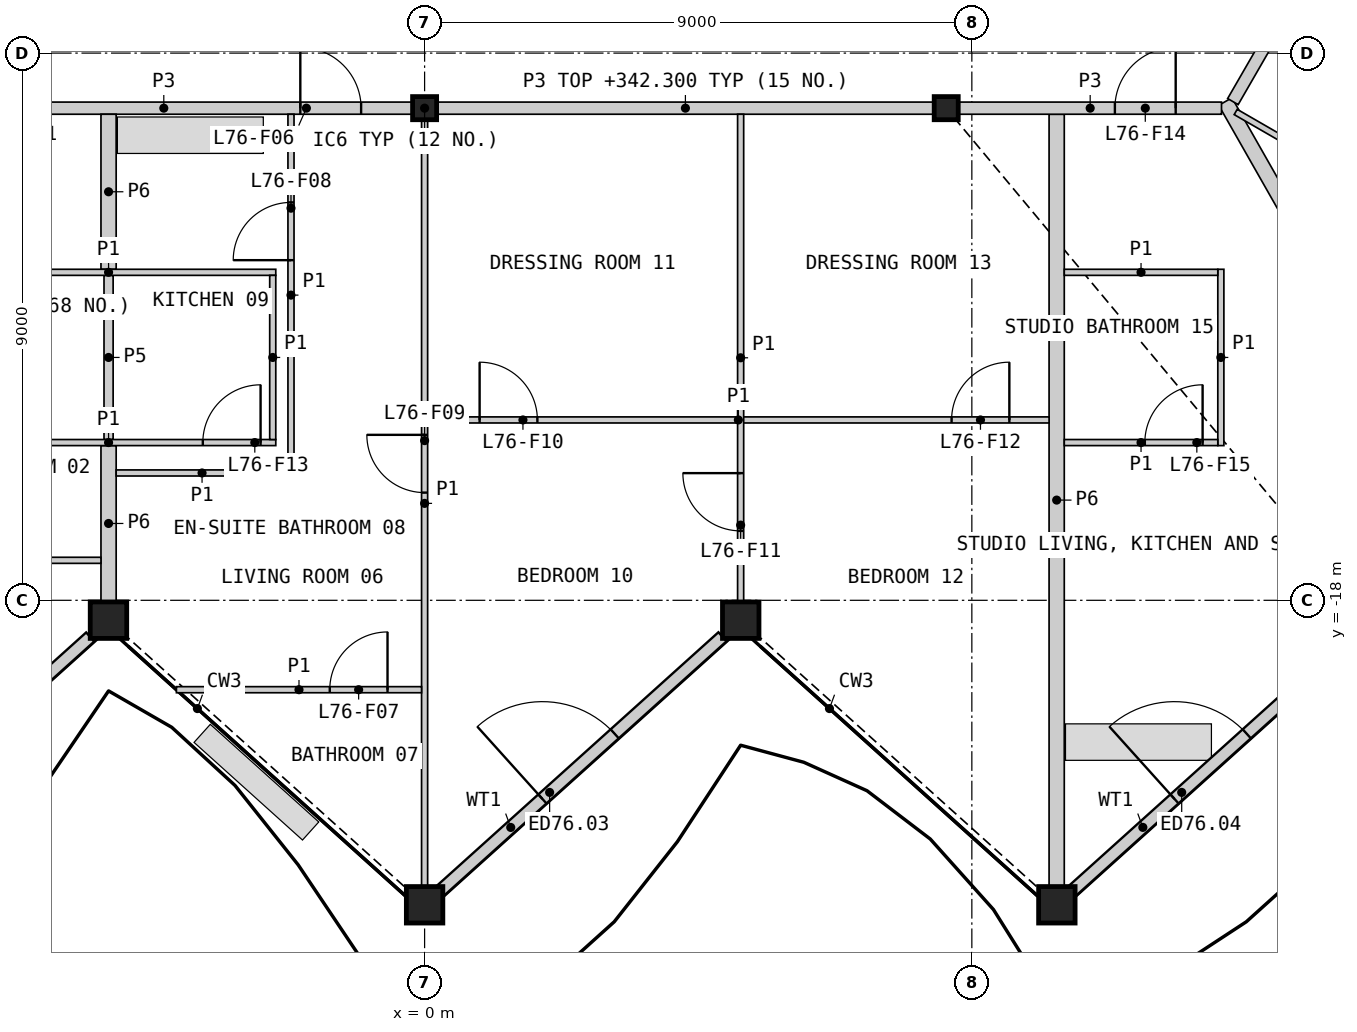
"""IFC4 building model, lengths in metres.
Left out: names, types, materials, properties, quantities, classifications, styles, units other than length and angle.
Written with IfcOpenShell. Run it as: python <this file> out.ifc"""

import sys

from ifc_helpers import new_model, si_unit, direction, frame, frame_2d, origin, origin_2d, place, context, subcontext, project, spatial, rectangle, hollow_rectangle, i_section, extrude, element, fill, save


model = new_model("IFC4")
c1 = context("Model", 3, precision=1e-05, world=origin(), true_north=direction((0.0, 1.0)))
c2 = subcontext(c1, "Body", "Model", "MODEL_VIEW")
j1 = project(units=[si_unit("LENGTHUNIT", "METRE"), si_unit("PLANEANGLEUNIT", "RADIAN")], contexts=[c1])
p1 = place(None, origin())
s1 = spatial("IfcSite", under=j1, at=p1, CompositionType="ELEMENT")
p2 = place(p1, origin())
s2 = spatial("IfcBuilding", under=s1, at=p2, CompositionType="ELEMENT")
p3 = place(p2, frame((0.0, 0.0, 339.2)))
s3 = spatial("IfcBuildingStorey", under=s2, at=p3, CompositionType="ELEMENT", Elevation=339.2)
for number, where, z_axis, x_axis in (
    (1, (-5.199, -18.327, 0.0), (0.0, 0.0, 1.0), (1.0, 0.0, 0.0)),
    (2, (0.0, -23.008, 0.0), (0.0, 0.0, 1.0), (1.0, 0.0, 0.0)),
    (3, (5.199, -18.327, 0.0), (0.0, 0.0, 1.0), (1.0, 0.0, 0.0)),
    (4, (10.398, -23.008, 0.0), (0.0, 0.0, 1.0), (1.0, 0.0, 0.0)),
):
    element("IfcColumn", number, at=place(p3, frame(where, z_axis=z_axis, x_axis=x_axis)), inside=s3, PredefinedType="COLUMN", context=c2, shape_type="SweptSolid", body=[
        extrude(hollow_rectangle(XDim=0.6, YDim=0.6, WallThickness=0.04, at=origin_2d()), origin(), (0.0, 0.0, 1.0), 3.4),
    ])
for number, where, z_axis, x_axis in (
    (5, (0.0, -9.906, 0.0), (0.0, 0.0, 1.0), (1.0, 0.0, 0.0)),
    (6, (8.578, -9.906, 0.0), (0.0, 0.0, 1.0), (1.0, 0.0, 0.0)),
):
    element("IfcColumn", number, at=place(p3, frame(where, z_axis=z_axis, x_axis=x_axis)), inside=s3, PredefinedType="COLUMN", context=c2, shape_type="SweptSolid", body=[
        extrude(i_section(OverallWidth=0.396, OverallDepth=0.381, WebThickness=0.019, FlangeThickness=0.03, at=origin_2d()), origin(), (0.0, 0.0, 1.0), 3.4),
    ])
p4 = place(p3, frame((-10.139, -22.781, 0.0), z_axis=(0.0, 0.0, 1.0), x_axis=(0.743144430218, 0.669131045339, 0.0)))
e7 = element("IfcWall", 7, at=p4, inside=s3, PredefinedType="SOLIDWALL", context=c2, shape_type="SweptSolid", body=[
    extrude(rectangle(XDim=6.244, YDim=0.2, at=frame_2d((3.122, 0.0))), origin(), (0.0, 0.0, 1.0), 2.488),
])
p5 = place(p4, frame((2.263, 0.0, 0.0)))
e8 = element("IfcOpeningElement", 8, at=p5, cuts=e7, PredefinedType="OPENING", context=c2, shape_type="SweptSolid", body=[
    extrude(rectangle(XDim=1.6, YDim=2.25, at=frame_2d((0.8, 1.125))), frame((0.0, 0.11, 0.0), z_axis=(0.0, -1.0, 0.0), x_axis=(1.0, 0.0, 0.0)), (0.0, 0.0, 1.0), 0.22),
])
p6 = place(p3, frame((0.256, -22.781, 0.0), z_axis=(0.0, 0.0, 1.0), x_axis=(0.743138703901, 0.669137404995, 0.0)))
e9 = element("IfcWall", 9, at=p6, inside=s3, PredefinedType="SOLIDWALL", context=c2, shape_type="SweptSolid", body=[
    extrude(rectangle(XDim=6.249, YDim=0.2, at=frame_2d((3.124, 0.0))), origin(), (0.0, 0.0, 1.0), 2.488),
])
p7 = place(p6, frame((2.263, 0.0, 0.0)))
e10 = element("IfcOpeningElement", 10, at=p7, cuts=e9, PredefinedType="OPENING", context=c2, shape_type="SweptSolid", body=[
    extrude(rectangle(XDim=1.6, YDim=2.25, at=frame_2d((0.8, 1.125))), frame((0.0, 0.11, 0.0), z_axis=(0.0, -1.0, 0.0), x_axis=(1.0, 0.0, 0.0)), (0.0, 0.0, 1.0), 0.22),
])
p8 = place(p3, frame((10.651, -22.781, 0.0), z_axis=(0.0, 0.0, 1.0), x_axis=(0.743154335217, 0.669120044572, 0.0)))
e11 = element("IfcWall", 11, at=p8, inside=s3, PredefinedType="SOLIDWALL", context=c2, shape_type="SweptSolid", body=[
    extrude(rectangle(XDim=6.252, YDim=0.2, at=frame_2d((3.126, 0.0))), origin(), (0.0, 0.0, 1.0), 2.488),
])
p9 = place(p8, frame((2.263, 0.0, 0.0)))
e12 = element("IfcOpeningElement", 12, at=p9, cuts=e11, PredefinedType="OPENING", context=c2, shape_type="SweptSolid", body=[
    extrude(rectangle(XDim=1.6, YDim=2.25, at=frame_2d((0.8, 1.125))), frame((0.0, 0.11, 0.0), z_axis=(0.0, -1.0, 0.0), x_axis=(1.0, 0.0, 0.0)), (0.0, 0.0, 1.0), 0.22),
])
p10 = place(p3, frame((13.169, -9.797, 0.0), z_axis=(0.0, 0.0, 1.0), x_axis=(0.494414335079, -0.869226360201, 0.0)))
e13 = element("IfcWall", 13, at=p10, inside=s3, PredefinedType="PARTITIONING", context=c2, shape_type="SweptSolid", body=[
    extrude(rectangle(XDim=14.842, YDim=0.25, at=frame_2d((7.421, 0.0))), origin(), (0.0, 0.0, 1.0), 2.33),
])
p11 = place(p3, frame((10.395, -22.698, 0.0), z_axis=(0.0, 0.0, 1.0), x_axis=(0.0, 1.0, 0.0)))
e14 = element("IfcWall", 14, at=p11, inside=s3, PredefinedType="PARTITIONING", context=c2, shape_type="SweptSolid", body=[
    extrude(rectangle(XDim=12.692, YDim=0.25, at=frame_2d((6.346, 0.0))), origin(), (0.0, 0.0, 1.0), 2.33),
])
p12 = place(p3, frame((0.208, -9.906, 0.0), z_axis=(0.0, 0.0, 1.0), x_axis=(1.0, 0.0, 0.0)))
e15 = element("IfcWall", 15, at=p12, inside=s3, PredefinedType="PARTITIONING", context=c2, shape_type="SweptSolid", body=[
    extrude(rectangle(XDim=8.163, YDim=0.2, at=frame_2d((4.082, 0.0))), origin(), (0.0, 0.0, 1.0), 3.1),
])
p13 = place(p3, frame((-8.371, -9.906, 0.0), z_axis=(0.0, 0.0, 1.0), x_axis=(1.0, 0.0, 0.0)))
e16 = element("IfcWall", 16, at=p13, inside=s3, PredefinedType="PARTITIONING", context=c2, shape_type="SweptSolid", body=[
    extrude(rectangle(XDim=8.163, YDim=0.2, at=frame_2d((4.082, 0.0))), origin(), (0.0, 0.0, 1.0), 3.1),
])
p14 = place(p13, frame((1.159, 0.0, 0.0)))
e17 = element("IfcOpeningElement", 17, at=p14, cuts=e16, PredefinedType="OPENING", context=c2, shape_type="SweptSolid", body=[
    extrude(rectangle(XDim=1.0, YDim=2.1, at=frame_2d((0.5, 1.05))), frame((0.0, 0.11, 0.0), z_axis=(0.0, -1.0, 0.0), x_axis=(1.0, 0.0, 0.0)), (0.0, 0.0, 1.0), 0.22),
])
p15 = place(p13, frame((6.327, 0.0, 0.0)))
e18 = element("IfcOpeningElement", 18, at=p15, cuts=e16, PredefinedType="OPENING", context=c2, shape_type="SweptSolid", body=[
    extrude(rectangle(XDim=1.0, YDim=2.1, at=frame_2d((0.5, 1.05))), frame((0.0, 0.11, 0.0), z_axis=(0.0, -1.0, 0.0), x_axis=(1.0, 0.0, 0.0)), (0.0, 0.0, 1.0), 0.22),
])
p16 = place(p3, frame((8.786, -9.906, 0.0), z_axis=(0.0, 0.0, 1.0), x_axis=(1.0, 0.0, 0.0)))
e19 = element("IfcWall", 19, at=p16, inside=s3, PredefinedType="PARTITIONING", context=c2, shape_type="SweptSolid", body=[
    extrude(rectangle(XDim=4.32, YDim=0.2, at=frame_2d((2.16, 0.0))), origin(), (0.0, 0.0, 1.0), 3.1),
])
p17 = place(p16, frame((2.566, 0.0, 0.0)))
e20 = element("IfcOpeningElement", 20, at=p17, cuts=e19, PredefinedType="OPENING", context=c2, shape_type="SweptSolid", body=[
    extrude(rectangle(XDim=1.0, YDim=2.1, at=frame_2d((0.5, 1.05))), frame((0.0, 0.11, 0.0), z_axis=(0.0, -1.0, 0.0), x_axis=(1.0, 0.0, 0.0)), (0.0, 0.0, 1.0), 0.22),
])
p18 = place(p3, frame((13.293, -9.797, 0.0), z_axis=(0.0, 0.0, 1.0), x_axis=(0.499967746641, 0.866044024469, 0.0)))
e21 = element("IfcWall", 21, at=p18, inside=s3, PredefinedType="PARTITIONING", context=c2, shape_type="SweptSolid", body=[
    extrude(rectangle(XDim=3.676, YDim=0.2, at=frame_2d((1.838, 0.0))), origin(), (0.0, 0.0, 1.0), 3.1),
])
p19 = place(p18, frame((2.426, 0.0, 0.0)))
e22 = element("IfcOpeningElement", 22, at=p19, cuts=e21, PredefinedType="OPENING", context=c2, shape_type="SweptSolid", body=[
    extrude(rectangle(XDim=1.0, YDim=2.1, at=frame_2d((0.5, 1.05))), frame((0.0, 0.11, 0.0), z_axis=(0.0, -1.0, 0.0), x_axis=(1.0, 0.0, 0.0)), (0.0, 0.0, 1.0), 0.22),
])
p20 = place(p3, frame((-5.198, -12.556, 0.0), z_axis=(0.0, 0.0, 1.0), x_axis=(0.0, 1.0, 0.0)))
e23 = element("IfcWall", 23, at=p20, inside=s3, PredefinedType="PARTITIONING", context=c2, shape_type="SweptSolid", body=[
    extrude(rectangle(XDim=2.55, YDim=0.25, at=frame_2d((1.275, 0.0))), origin(), (0.0, 0.0, 1.0), 2.33),
])
p21 = place(p3, frame((-5.198, -18.017, 0.0), z_axis=(0.0, 0.0, 1.0), x_axis=(0.0, 1.0, 0.0)))
e24 = element("IfcWall", 24, at=p21, inside=s3, PredefinedType="PARTITIONING", context=c2, shape_type="SweptSolid", body=[
    extrude(rectangle(XDim=2.561, YDim=0.25, at=frame_2d((1.281, 0.0))), origin(), (0.0, 0.0, 1.0), 2.33),
])
p22 = place(p3, frame((-5.198, -15.356, 0.0), z_axis=(0.0, 0.0, 1.0), x_axis=(0.0, 1.0, 0.0)))
e25 = element("IfcWall", 25, at=p22, inside=s3, PredefinedType="PLUMBINGWALL", context=c2, shape_type="SweptSolid", body=[
    extrude(rectangle(XDim=2.7, YDim=0.15, at=frame_2d((1.35, 0.0))), origin(), (0.0, 0.0, 1.0), 2.33),
])
p23 = place(p3, frame((0.0, -22.698, 0.0), z_axis=(0.0, 0.0, 1.0), x_axis=(0.0, 1.0, 0.0)))
e26 = element("IfcWall", 26, at=p23, inside=s3, PredefinedType="PARTITIONING", context=c2, shape_type="SweptSolid", body=[
    extrude(rectangle(XDim=12.585, YDim=0.1, at=frame_2d((6.292, 0.0))), origin(), (0.0, 0.0, 1.0), 2.33),
])
p24 = place(p23, frame((6.469, 0.0, 0.0)))
e27 = element("IfcOpeningElement", 27, at=p24, cuts=e26, PredefinedType="OPENING", context=c2, shape_type="SweptSolid", body=[
    extrude(rectangle(XDim=0.95, YDim=2.1, at=frame_2d((0.475, 1.05))), frame((0.0, 0.06, 0.0), z_axis=(0.0, -1.0, 0.0), x_axis=(1.0, 0.0, 0.0)), (0.0, 0.0, 1.0), 0.12),
])
p25 = place(p3, frame((0.05, -15.033, 0.0), z_axis=(0.0, 0.0, 1.0), x_axis=(1.0, 0.0, 0.0)))
e28 = element("IfcWall", 28, at=p25, inside=s3, PredefinedType="PARTITIONING", context=c2, shape_type="SweptSolid", body=[
    extrude(rectangle(XDim=10.22, YDim=0.1, at=frame_2d((5.11, 0.0))), origin(), (0.0, 0.0, 1.0), 2.33),
])
p26 = place(p25, frame((0.855, 0.0, 0.0)))
e29 = element("IfcOpeningElement", 29, at=p26, cuts=e28, PredefinedType="OPENING", context=c2, shape_type="SweptSolid", body=[
    extrude(rectangle(XDim=0.95, YDim=2.1, at=frame_2d((0.475, 1.05))), frame((0.0, 0.06, 0.0), z_axis=(0.0, -1.0, 0.0), x_axis=(1.0, 0.0, 0.0)), (0.0, 0.0, 1.0), 0.12),
])
p27 = place(p25, frame((8.617, 0.0, 0.0)))
e30 = element("IfcOpeningElement", 30, at=p27, cuts=e28, PredefinedType="OPENING", context=c2, shape_type="SweptSolid", body=[
    extrude(rectangle(XDim=0.95, YDim=2.1, at=frame_2d((0.475, 1.05))), frame((0.0, 0.06, 0.0), z_axis=(0.0, -1.0, 0.0), x_axis=(1.0, 0.0, 0.0)), (0.0, 0.0, 1.0), 0.12),
])
p28 = place(p3, frame((5.198, -18.017, 0.0), z_axis=(0.0, 0.0, 1.0), x_axis=(0.0, 1.0, 0.0)))
e31 = element("IfcWall", 31, at=p28, inside=s3, PredefinedType="PARTITIONING", context=c2, shape_type="SweptSolid", body=[
    extrude(rectangle(XDim=8.011, YDim=0.1, at=frame_2d((4.006, 0.0))), origin(), (0.0, 0.0, 1.0), 2.33),
])
p29 = place(p28, frame((1.158, 0.0, 0.0)))
e32 = element("IfcOpeningElement", 32, at=p29, cuts=e31, PredefinedType="OPENING", context=c2, shape_type="SweptSolid", body=[
    extrude(rectangle(XDim=0.95, YDim=2.1, at=frame_2d((0.475, 1.05))), frame((0.0, 0.06, 0.0), z_axis=(0.0, -1.0, 0.0), x_axis=(1.0, 0.0, 0.0)), (0.0, 0.0, 1.0), 0.12),
])
p30 = place(p3, frame((-2.198, -15.956, 0.0), z_axis=(0.0, 0.0, 1.0), x_axis=(0.0, 1.0, 0.0)))
e33 = element("IfcWall", 33, at=p30, inside=s3, PredefinedType="PARTITIONING", context=c2, shape_type="SweptSolid", body=[
    extrude(rectangle(XDim=5.95, YDim=0.1, at=frame_2d((2.975, 0.0))), origin(), (0.0, 0.0, 1.0), 2.33),
])
p31 = place(p30, frame((3.55, 0.0, 0.0)))
e34 = element("IfcOpeningElement", 34, at=p31, cuts=e33, PredefinedType="OPENING", context=c2, shape_type="SweptSolid", body=[
    extrude(rectangle(XDim=0.95, YDim=2.1, at=frame_2d((0.475, 1.05))), frame((0.0, 0.06, 0.0), z_axis=(0.0, -1.0, 0.0), x_axis=(1.0, 0.0, 0.0)), (0.0, 0.0, 1.0), 0.12),
])
p32 = place(p3, frame((-7.948, -12.606, 0.0), z_axis=(0.0, 0.0, 1.0), x_axis=(1.0, 0.0, 0.0)))
e35 = element("IfcWall", 35, at=p32, inside=s3, PredefinedType="PARTITIONING", context=c2, shape_type="SweptSolid", body=[
    extrude(rectangle(XDim=5.5, YDim=0.1, at=frame_2d((2.75, 0.0))), origin(), (0.0, 0.0, 1.0), 2.33),
])
p33 = place(p3, frame((-7.948, -15.406, 0.0), z_axis=(0.0, 0.0, 1.0), x_axis=(1.0, 0.0, 0.0)))
e36 = element("IfcWall", 36, at=p33, inside=s3, PredefinedType="PARTITIONING", context=c2, shape_type="SweptSolid", body=[
    extrude(rectangle(XDim=5.5, YDim=0.1, at=frame_2d((2.75, 0.0))), origin(), (0.0, 0.0, 1.0), 2.33),
])
p34 = place(p33, frame((4.3, 0.0, 0.0)))
e37 = element("IfcOpeningElement", 37, at=p34, cuts=e36, PredefinedType="OPENING", context=c2, shape_type="SweptSolid", body=[
    extrude(rectangle(XDim=0.95, YDim=2.1, at=frame_2d((0.475, 1.05))), frame((0.0, 0.06, 0.0), z_axis=(0.0, -1.0, 0.0), x_axis=(1.0, 0.0, 0.0)), (0.0, 0.0, 1.0), 0.12),
])
p35 = place(p3, frame((-10.345, -17.342, 0.0), z_axis=(0.0, 0.0, 1.0), x_axis=(1.0, 0.0, 0.0)))
e38 = element("IfcWall", 38, at=p35, inside=s3, PredefinedType="PARTITIONING", context=c2, shape_type="SweptSolid", body=[
    extrude(rectangle(XDim=5.023, YDim=0.1, at=frame_2d((2.511, 0.0))), origin(), (0.0, 0.0, 1.0), 2.33),
])
p36 = place(p35, frame((0.76, 0.0, 0.0)))
e39 = element("IfcOpeningElement", 39, at=p36, cuts=e38, PredefinedType="OPENING", context=c2, shape_type="SweptSolid", body=[
    extrude(rectangle(XDim=0.95, YDim=2.1, at=frame_2d((0.475, 1.05))), frame((0.0, 0.06, 0.0), z_axis=(0.0, -1.0, 0.0), x_axis=(1.0, 0.0, 0.0)), (0.0, 0.0, 1.0), 0.12),
])
p37 = place(p3, frame((-4.082, -19.47, 0.0), z_axis=(0.0, 0.0, 1.0), x_axis=(1.0, 0.0, 0.0)))
e40 = element("IfcWall", 40, at=p37, inside=s3, PredefinedType="PARTITIONING", context=c2, shape_type="SweptSolid", body=[
    extrude(rectangle(XDim=4.031, YDim=0.1, at=frame_2d((2.016, 0.0))), origin(), (0.0, 0.0, 1.0), 2.33),
])
p38 = place(p37, frame((2.522, 0.0, 0.0)))
e41 = element("IfcOpeningElement", 41, at=p38, cuts=e40, PredefinedType="OPENING", context=c2, shape_type="SweptSolid", body=[
    extrude(rectangle(XDim=0.95, YDim=2.1, at=frame_2d((0.475, 1.05))), frame((0.0, 0.06, 0.0), z_axis=(0.0, -1.0, 0.0), x_axis=(1.0, 0.0, 0.0)), (0.0, 0.0, 1.0), 0.12),
])
p39 = place(p3, frame((-5.073, -15.906, 0.0), z_axis=(0.0, 0.0, 1.0), x_axis=(1.0, 0.0, 0.0)))
e42 = element("IfcWall", 42, at=p39, inside=s3, PredefinedType="PARTITIONING", context=c2, shape_type="SweptSolid", body=[
    extrude(rectangle(XDim=2.825, YDim=0.1, at=frame_2d((1.413, 0.0))), origin(), (0.0, 0.0, 1.0), 2.33),
])
p40 = place(p3, frame((-2.498, -15.356, 0.0), z_axis=(0.0, 0.0, 1.0), x_axis=(0.0, 1.0, 0.0)))
e43 = element("IfcWall", 43, at=p40, inside=s3, PredefinedType="PARTITIONING", context=c2, shape_type="SweptSolid", body=[
    extrude(rectangle(XDim=2.7, YDim=0.1, at=frame_2d((1.35, 0.0))), origin(), (0.0, 0.0, 1.0), 2.33),
])
p41 = place(p3, frame((13.095, -15.456, 0.0), z_axis=(0.0, 0.0, 1.0), x_axis=(0.0, 1.0, 0.0)))
e44 = element("IfcWall", 44, at=p41, inside=s3, PredefinedType="PARTITIONING", context=c2, shape_type="SweptSolid", body=[
    extrude(rectangle(XDim=2.9, YDim=0.1, at=frame_2d((1.45, 0.0))), origin(), (0.0, 0.0, 1.0), 2.33),
])
p42 = place(p3, frame((10.52, -12.606, 0.0), z_axis=(0.0, 0.0, 1.0), x_axis=(1.0, 0.0, 0.0)))
e45 = element("IfcWall", 45, at=p42, inside=s3, PredefinedType="PARTITIONING", context=c2, shape_type="SweptSolid", body=[
    extrude(rectangle(XDim=2.525, YDim=0.1, at=frame_2d((1.263, 0.0))), origin(), (0.0, 0.0, 1.0), 2.33),
])
p43 = place(p3, frame((10.52, -15.406, 0.0), z_axis=(0.0, 0.0, 1.0), x_axis=(1.0, 0.0, 0.0)))
e46 = element("IfcWall", 46, at=p43, inside=s3, PredefinedType="PARTITIONING", context=c2, shape_type="SweptSolid", body=[
    extrude(rectangle(XDim=2.525, YDim=0.1, at=frame_2d((1.263, 0.0))), origin(), (0.0, 0.0, 1.0), 2.33),
])
p44 = place(p43, frame((1.325, 0.0, 0.0)))
e47 = element("IfcOpeningElement", 47, at=p44, cuts=e46, PredefinedType="OPENING", context=c2, shape_type="SweptSolid", body=[
    extrude(rectangle(XDim=0.95, YDim=2.1, at=frame_2d((0.475, 1.05))), frame((0.0, 0.06, 0.0), z_axis=(0.0, -1.0, 0.0), x_axis=(1.0, 0.0, 0.0)), (0.0, 0.0, 1.0), 0.12),
])
p45 = place(p3, frame((13.339, -9.968, 0.0), z_axis=(0.0, 0.0, 1.0), x_axis=(0.866036909293, -0.499980071345, 0.0)))
e48 = element("IfcWall", 48, at=p45, inside=s3, PredefinedType="PARTITIONING", context=c2, shape_type="SweptSolid", body=[
    extrude(rectangle(XDim=2.625, YDim=0.1, at=frame_2d((1.312, 0.0))), origin(), (0.0, 0.0, 1.0), 2.33),
])
p46 = place(p7, origin())
e49 = element("IfcDoor", 49, at=p46, inside=s3, OperationType="DOUBLE_DOOR_SINGLE_SWING", PredefinedType="DOOR", context=c2, shape_type="SweptSolid", body=[
    extrude(rectangle(XDim=1.6, YDim=2.25, at=frame_2d((0.8, 1.125))), frame((0.0, 0.025, 0.0), z_axis=(0.0, -1.0, 0.0), x_axis=(1.0, 0.0, 0.0)), (0.0, 0.0, 1.0), 0.05),
])
fill(e10, e49)
p47 = place(p9, origin())
e50 = element("IfcDoor", 50, at=p47, inside=s3, OperationType="DOUBLE_DOOR_SINGLE_SWING", PredefinedType="DOOR", context=c2, shape_type="SweptSolid", body=[
    extrude(rectangle(XDim=1.6, YDim=2.25, at=frame_2d((0.8, 1.125))), frame((0.0, 0.025, 0.0), z_axis=(0.0, -1.0, 0.0), x_axis=(1.0, 0.0, 0.0)), (0.0, 0.0, 1.0), 0.05),
])
fill(e12, e50)
p48 = place(p15, origin())
e51 = element("IfcDoor", 51, at=p48, inside=s3, OperationType="SINGLE_SWING_LEFT", PredefinedType="DOOR", context=c2, shape_type="SweptSolid", body=[
    extrude(rectangle(XDim=1.0, YDim=2.1, at=frame_2d((0.5, 1.05))), frame((0.0, 0.025, 0.0), z_axis=(0.0, -1.0, 0.0), x_axis=(1.0, 0.0, 0.0)), (0.0, 0.0, 1.0), 0.05),
])
fill(e18, e51)
p49 = place(p38, origin())
e52 = element("IfcDoor", 52, at=p49, inside=s3, OperationType="SINGLE_SWING_RIGHT", PredefinedType="DOOR", context=c2, shape_type="SweptSolid", body=[
    extrude(rectangle(XDim=0.95, YDim=2.1, at=frame_2d((0.475, 1.05))), frame((0.0, 0.025, 0.0), z_axis=(0.0, -1.0, 0.0), x_axis=(1.0, 0.0, 0.0)), (0.0, 0.0, 1.0), 0.05),
])
fill(e41, e52)
p50 = place(p31, origin())
e53 = element("IfcDoor", 53, at=p50, inside=s3, OperationType="SINGLE_SWING_LEFT", PredefinedType="DOOR", context=c2, shape_type="SweptSolid", body=[
    extrude(rectangle(XDim=0.95, YDim=2.1, at=frame_2d((0.475, 1.05))), frame((0.0, 0.025, 0.0), z_axis=(0.0, -1.0, 0.0), x_axis=(1.0, 0.0, 0.0)), (0.0, 0.0, 1.0), 0.05),
])
fill(e34, e53)
p51 = place(p24, origin())
e54 = element("IfcDoor", 54, at=p51, inside=s3, OperationType="SINGLE_SWING_RIGHT", PredefinedType="DOOR", context=c2, shape_type="SweptSolid", body=[
    extrude(rectangle(XDim=0.95, YDim=2.1, at=frame_2d((0.475, 1.05))), frame((0.0, 0.025, 0.0), z_axis=(0.0, -1.0, 0.0), x_axis=(1.0, 0.0, 0.0)), (0.0, 0.0, 1.0), 0.05),
])
fill(e27, e54)
p52 = place(p26, origin())
e55 = element("IfcDoor", 55, at=p52, inside=s3, OperationType="SINGLE_SWING_LEFT", PredefinedType="DOOR", context=c2, shape_type="SweptSolid", body=[
    extrude(rectangle(XDim=0.95, YDim=2.1, at=frame_2d((0.475, 1.05))), frame((0.0, 0.025, 0.0), z_axis=(0.0, -1.0, 0.0), x_axis=(1.0, 0.0, 0.0)), (0.0, 0.0, 1.0), 0.05),
])
fill(e29, e55)
p53 = place(p29, origin())
e56 = element("IfcDoor", 56, at=p53, inside=s3, OperationType="SINGLE_SWING_RIGHT", PredefinedType="DOOR", context=c2, shape_type="SweptSolid", body=[
    extrude(rectangle(XDim=0.95, YDim=2.1, at=frame_2d((0.475, 1.05))), frame((0.0, 0.025, 0.0), z_axis=(0.0, -1.0, 0.0), x_axis=(1.0, 0.0, 0.0)), (0.0, 0.0, 1.0), 0.05),
])
fill(e32, e56)
p54 = place(p27, origin())
e57 = element("IfcDoor", 57, at=p54, inside=s3, OperationType="SINGLE_SWING_RIGHT", PredefinedType="DOOR", context=c2, shape_type="SweptSolid", body=[
    extrude(rectangle(XDim=0.95, YDim=2.1, at=frame_2d((0.475, 1.05))), frame((0.0, 0.025, 0.0), z_axis=(0.0, -1.0, 0.0), x_axis=(1.0, 0.0, 0.0)), (0.0, 0.0, 1.0), 0.05),
])
fill(e30, e57)
p55 = place(p34, origin())
e58 = element("IfcDoor", 58, at=p55, inside=s3, OperationType="SINGLE_SWING_RIGHT", PredefinedType="DOOR", context=c2, shape_type="SweptSolid", body=[
    extrude(rectangle(XDim=0.95, YDim=2.1, at=frame_2d((0.475, 1.05))), frame((0.0, 0.025, 0.0), z_axis=(0.0, -1.0, 0.0), x_axis=(1.0, 0.0, 0.0)), (0.0, 0.0, 1.0), 0.05),
])
fill(e37, e58)
p56 = place(p17, origin())
e59 = element("IfcDoor", 59, at=p56, inside=s3, OperationType="SINGLE_SWING_RIGHT", PredefinedType="DOOR", context=c2, shape_type="SweptSolid", body=[
    extrude(rectangle(XDim=1.0, YDim=2.1, at=frame_2d((0.5, 1.05))), frame((0.0, 0.025, 0.0), z_axis=(0.0, -1.0, 0.0), x_axis=(1.0, 0.0, 0.0)), (0.0, 0.0, 1.0), 0.05),
])
fill(e20, e59)
p57 = place(p44, origin())
e60 = element("IfcDoor", 60, at=p57, inside=s3, OperationType="SINGLE_SWING_RIGHT", PredefinedType="DOOR", context=c2, shape_type="SweptSolid", body=[
    extrude(rectangle(XDim=0.95, YDim=2.1, at=frame_2d((0.475, 1.05))), frame((0.0, 0.025, 0.0), z_axis=(0.0, -1.0, 0.0), x_axis=(1.0, 0.0, 0.0)), (0.0, 0.0, 1.0), 0.05),
])
fill(e47, e60)
save(model, sys.argv[1])
